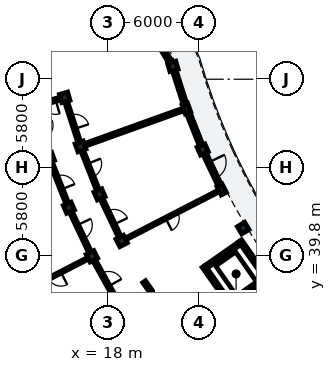
"""IFC4 building model, lengths in metres.
Left out: names, types, materials, properties, quantities, classifications, styles, units other than length and angle.
Written with IfcOpenShell. Run it as: python <this file> out.ifc"""

import sys

from ifc_helpers import new_model, si_unit, direction, frame, frame_2d, origin, origin_2d, place, context, subcontext, project, spatial, rectangle, extrude, element, fill, save


model = new_model("IFC4")
c1 = context("Model", 3, precision=1e-05, world=origin(), true_north=direction((0.0, 1.0)))
c2 = subcontext(c1, "Body", "Model", "MODEL_VIEW")
j1 = project(units=[si_unit("LENGTHUNIT", "METRE"), si_unit("PLANEANGLEUNIT", "RADIAN")], contexts=[c1])
p1 = place(None, origin())
s1 = spatial("IfcSite", under=j1, at=p1, CompositionType="ELEMENT")
p2 = place(p1, origin())
s2 = spatial("IfcBuilding", under=s1, at=p2, CompositionType="ELEMENT")
p3 = place(p2, frame((0.0, 0.0, 15.56)))
s3 = spatial("IfcBuildingStorey", under=s2, at=p3, CompositionType="ELEMENT", Elevation=15.56)
p4 = place(p3, frame((23.296, 34.01, 0.0), z_axis=(0.0, 0.0, 1.0), x_axis=(0.819153711596, 0.573574055182, 0.0)))
e1 = element("IfcWall", 1, at=p4, inside=s3, PredefinedType="SHEAR", context=c2, shape_type="SweptSolid", body=[
    extrude(rectangle(XDim=6.6, YDim=0.25, at=frame_2d((3.3, 0.0))), origin(), (0.0, 0.0, 1.0), 3.11),
])
p5 = place(p4, frame((0.22, 0.0, 0.0)))
e2 = element("IfcOpeningElement", 2, at=p5, cuts=e1, PredefinedType="OPENING", context=c2, shape_type="SweptSolid", body=[
    extrude(rectangle(XDim=1.05, YDim=2.15, at=frame_2d((0.525, 1.075))), frame((0.0, 0.135, 0.0), z_axis=(0.0, -1.0, 0.0), x_axis=(1.0, 0.0, 0.0)), (0.0, 0.0, 1.0), 0.27),
])
p6 = place(p3, frame((26.169, 36.419, 0.0), z_axis=(0.0, 0.0, 1.0), x_axis=(-0.573582966431, 0.819147471839, 0.0)))
e3 = element("IfcWall", 3, at=p6, inside=s3, PredefinedType="SHEAR", context=c2, shape_type="SweptSolid", body=[
    extrude(rectangle(XDim=3.26, YDim=0.23, at=frame_2d((1.63, 0.0))), origin(), (0.0, 0.0, 1.0), 3.11),
])
p7 = place(p6, frame((0.9, 0.0, 0.0)))
e4 = element("IfcOpeningElement", 4, at=p7, cuts=e3, PredefinedType="OPENING", context=c2, shape_type="SweptSolid", body=[
    extrude(rectangle(XDim=1.1, YDim=2.15, at=frame_2d((0.55, 1.075))), frame((0.0, 0.125, 0.0), z_axis=(0.0, -1.0, 0.0), x_axis=(1.0, 0.0, 0.0)), (0.0, 0.0, 1.0), 0.25),
])
p8 = place(p3, frame((28.569, 38.1, 0.0), z_axis=(0.0, 0.0, 1.0), x_axis=(-0.573582966431, 0.819147471839, 0.0)))
e5 = element("IfcWall", 5, at=p8, inside=s3, PredefinedType="SHEAR", context=c2, shape_type="SweptSolid", body=[
    extrude(rectangle(XDim=3.26, YDim=0.23, at=frame_2d((1.63, 0.0))), origin(), (0.0, 0.0, 1.0), 3.11),
])
p9 = place(p3, frame((26.197, 36.579, 0.0), z_axis=(0.0, 0.0, 1.0), x_axis=(0.819159695432, 0.573565509231, 0.0)))
e6 = element("IfcWall", 6, at=p9, inside=s3, PredefinedType="SHEAR", context=c2, shape_type="SweptSolid", body=[
    extrude(rectangle(XDim=2.7, YDim=0.23, at=frame_2d((1.35, 0.0))), origin(), (0.0, 0.0, 1.0), 3.11),
])
p10 = place(p3, frame((24.459, 39.061, 0.0), z_axis=(0.0, 0.0, 1.0), x_axis=(0.819189439894, 0.573523026186, 0.0)))
e7 = element("IfcWall", 7, at=p10, inside=s3, PredefinedType="SHEAR", context=c2, shape_type="SweptSolid", body=[
    extrude(rectangle(XDim=2.7, YDim=0.23, at=frame_2d((1.35, 0.0))), origin(), (0.0, 0.0, 1.0), 3.11),
])
for number, where, z_axis, x_axis in (
    (8, (22.272, 52.248, 0.0), (0.0, 0.0, 1.0), (-0.961, -0.276, 0.0)),
    (9, (15.159, 50.208, 0.0), (0.0, 0.0, 1.0), (-0.961, -0.276, 0.0)),
):
    element("IfcColumn", number, at=place(p3, frame(where, z_axis=z_axis, x_axis=x_axis)), inside=s3, PredefinedType="COLUMN", context=c2, shape_type="SweptSolid", body=[
        extrude(rectangle(XDim=0.56, YDim=0.56, at=origin_2d()), origin(), (0.0, 0.0, 1.0), 3.11),
    ])
p11 = place(p3, frame((23.165, 49.479, 0.0), z_axis=(0.0, 0.0, 1.0), x_axis=(-0.941176015256, -0.337916718003, 0.0)))
e10 = element("IfcColumn", 10, at=p11, inside=s3, PredefinedType="PILASTER", context=c2, shape_type="SweptSolid", body=[
    extrude(rectangle(XDim=0.38, YDim=0.62, at=origin_2d()), origin(), (0.0, 0.0, 1.0), 3.11),
])
for number, where, z_axis, x_axis in (
    (11, (16.2, 46.979, 0.0), (0.0, 0.0, 1.0), (-0.941, -0.338, 0.0)),
    (12, (14.129, 46.236, 0.0), (0.0, 0.0, 1.0), (-0.941, -0.338, 0.0)),
    (13, (24.237, 46.776, 0.0), (0.0, 0.0, 1.0), (-0.917, -0.399, 0.0)),
    (14, (17.45, 43.825, 0.0), (0.0, 0.0, 1.0), (-0.917, -0.399, 0.0)),
    (15, (15.433, 42.948, 0.0), (0.0, 0.0, 1.0), (-0.917, -0.399, 0.0)),
):
    element("IfcColumn", number, at=place(p3, frame(where, z_axis=z_axis, x_axis=x_axis)), inside=s3, PredefinedType="COLUMN", context=c2, shape_type="SweptSolid", body=[
        extrude(rectangle(XDim=0.56, YDim=0.56, at=origin_2d()), origin(), (0.0, 0.0, 1.0), 3.11),
    ])
p12 = place(p3, frame((25.483, 44.147, 0.0), z_axis=(0.0, 0.0, 1.0), x_axis=(-0.889017141486, -0.457873915117, 0.0)))
e16 = element("IfcColumn", 16, at=p12, inside=s3, PredefinedType="PILASTER", context=c2, shape_type="SweptSolid", body=[
    extrude(rectangle(XDim=0.38, YDim=0.62, at=origin_2d()), origin(), (0.0, 0.0, 1.0), 3.11),
])
for number, where, z_axis, x_axis in (
    (17, (18.905, 40.759, 0.0), (0.0, 0.0, 1.0), (-0.889, -0.458, 0.0)),
    (18, (16.949, 39.752, 0.0), (0.0, 0.0, 1.0), (-0.889, -0.458, 0.0)),
    (19, (26.899, 41.606, 0.0), (0.0, 0.0, 1.0), (-0.857, -0.515, 0.0)),
):
    element("IfcColumn", number, at=place(p3, frame(where, z_axis=z_axis, x_axis=x_axis)), inside=s3, PredefinedType="COLUMN", context=c2, shape_type="SweptSolid", body=[
        extrude(rectangle(XDim=0.56, YDim=0.56, at=origin_2d()), origin(), (0.0, 0.0, 1.0), 3.11),
    ])
p13 = place(p3, frame((22.349, 52.01, 0.0), z_axis=(0.0, 0.0, 1.0), x_axis=(0.306979942778, -0.951715984279, 0.0)))
e20 = element("IfcWall", 20, at=p13, inside=s3, PredefinedType="SOLIDWALL", context=c2, shape_type="SweptSolid", body=[
    extrude(rectangle(XDim=2.499, YDim=0.245, at=frame_2d((1.25, 0.0))), origin(), (0.0, 0.0, 1.0), 2.355),
])
p14 = place(p13, frame((0.649, 0.0, 0.55)))
e21 = element("IfcOpeningElement", 21, at=p14, cuts=e20, PredefinedType="OPENING", context=c2, shape_type="SweptSolid", body=[
    extrude(rectangle(XDim=1.2, YDim=1.51, at=frame_2d((0.6, 0.755))), frame((0.0, 0.133, 0.0), z_axis=(0.0, -1.0, 0.0), x_axis=(1.0, 0.0, 0.0)), (0.0, 0.0, 1.0), 0.265),
])
p15 = place(p3, frame((23.224, 49.331, 0.0), z_axis=(0.0, 0.0, 1.0), x_axis=(0.368558756085, -0.9296044553, 0.0)))
e22 = element("IfcWall", 22, at=p15, inside=s3, PredefinedType="SOLIDWALL", context=c2, shape_type="SweptSolid", body=[
    extrude(rectangle(XDim=2.499, YDim=0.245, at=frame_2d((1.249, 0.0))), origin(), (0.0, 0.0, 1.0), 2.355),
])
p16 = place(p15, frame((0.589, 0.0, 0.55)))
e23 = element("IfcOpeningElement", 23, at=p16, cuts=e22, PredefinedType="OPENING", context=c2, shape_type="SweptSolid", body=[
    extrude(rectangle(XDim=1.32, YDim=1.585, at=frame_2d((0.66, 0.792))), frame((0.0, 0.133, 0.0), z_axis=(0.0, -1.0, 0.0), x_axis=(1.0, 0.0, 0.0)), (0.0, 0.0, 1.0), 0.265),
])
p17 = place(p3, frame((24.344, 46.55, 0.0), z_axis=(0.0, 0.0, 1.0), x_axis=(0.428514676045, -0.903534820809, 0.0)))
e24 = element("IfcWall", 24, at=p17, inside=s3, PredefinedType="SOLIDWALL", context=c2, shape_type="SweptSolid", body=[
    extrude(rectangle(XDim=2.499, YDim=0.245, at=frame_2d((1.25, 0.0))), origin(), (0.0, 0.0, 1.0), 2.355),
])
p18 = place(p17, frame((0.679, 0.0, 0.0)))
e25 = element("IfcOpeningElement", 25, at=p18, cuts=e24, PredefinedType="OPENING", context=c2, shape_type="SweptSolid", body=[
    extrude(rectangle(XDim=1.14, YDim=2.16, at=frame_2d((0.57, 1.08))), frame((0.0, 0.133, 0.0), z_axis=(0.0, -1.0, 0.0), x_axis=(1.0, 0.0, 0.0)), (0.0, 0.0, 1.0), 0.265),
])
p19 = place(p3, frame((20.259, 55.598, 0.0), z_axis=(0.0, 0.0, 1.0), x_axis=(0.515037642827, -0.857167560324, 0.0)))
e26 = element("IfcWall", 26, at=p19, inside=s3, PredefinedType="SOLIDWALL", context=c2, shape_type="SweptSolid", body=[
    extrude(rectangle(XDim=3.908, YDim=0.245, at=frame_2d((1.954, 0.0))), origin(), (0.0, 0.0, 1.0), 2.355),
])
p20 = place(p19, frame((0.979, 0.0, 0.4)))
e27 = element("IfcOpeningElement", 27, at=p20, cuts=e26, PredefinedType="OPENING", context=c2, shape_type="SweptSolid", body=[
    extrude(rectangle(XDim=1.95, YDim=1.78, at=frame_2d((0.975, 0.89))), frame((0.0, 0.133, 0.0), z_axis=(0.0, -1.0, 0.0), x_axis=(1.0, 0.0, 0.0)), (0.0, 0.0, 1.0), 0.265),
])
p21 = place(p3, frame((23.195, 34.068, 0.0), z_axis=(0.0, 0.0, 1.0), x_axis=(-0.573572687386, 0.819154669329, 0.0)))
e28 = element("IfcWall", 28, at=p21, inside=s3, PredefinedType="PARTITIONING", context=c2, shape_type="SweptSolid", body=[
    extrude(rectangle(XDim=4.9, YDim=0.22, at=frame_2d((2.45, 0.0))), origin(), (0.0, 0.0, 1.0), 2.34),
])
p22 = place(p21, frame((1.95, 0.0, 0.0)))
e29 = element("IfcOpeningElement", 29, at=p22, cuts=e28, PredefinedType="OPENING", context=c2, shape_type="SweptSolid", body=[
    extrude(rectangle(XDim=1.0, YDim=2.15, at=frame_2d((0.5, 1.075))), frame((0.0, 0.12, 0.0), z_axis=(0.0, -1.0, 0.0), x_axis=(1.0, 0.0, 0.0)), (0.0, 0.0, 1.0), 0.24),
])
p23 = place(p3, frame((15.266, 49.875, 0.0), z_axis=(0.0, 0.0, 1.0), x_axis=(0.306883578189, -0.951747061691, 0.0)))
e30 = element("IfcWall", 30, at=p23, inside=s3, PredefinedType="PARTITIONING", context=c2, shape_type="SweptSolid", body=[
    extrude(rectangle(XDim=2.693, YDim=0.195, at=frame_2d((1.346, 0.0))), origin(), (0.0, 0.0, 1.0), 2.37),
])
p24 = place(p23, frame((0.872, 0.0, 0.0)))
e31 = element("IfcOpeningElement", 31, at=p24, cuts=e30, PredefinedType="OPENING", context=c2, shape_type="SweptSolid", body=[
    extrude(rectangle(XDim=0.95, YDim=2.13, at=frame_2d((0.475, 1.065))), frame((0.0, 0.107, 0.0), z_axis=(0.0, -1.0, 0.0), x_axis=(1.0, 0.0, 0.0)), (0.0, 0.0, 1.0), 0.215),
])
p25 = place(p3, frame((22.788, 49.344, 0.0), z_axis=(0.0, 0.0, 1.0), x_axis=(-0.941179890997, -0.337905922978, 0.0)))
e32 = element("IfcWall", 32, at=p25, inside=s3, PredefinedType="PARTITIONING", context=c2, shape_type="SweptSolid", body=[
    extrude(rectangle(XDim=6.6, YDim=0.185, at=frame_2d((3.3, 0.0))), origin(), (0.0, 0.0, 1.0), 2.37),
])
p26 = place(p3, frame((14.258, 45.91, 0.0), z_axis=(0.0, 0.0, 1.0), x_axis=(0.368584691693, -0.929594172233, 0.0)))
e33 = element("IfcWall", 33, at=p26, inside=s3, PredefinedType="PARTITIONING", context=c2, shape_type="SweptSolid", body=[
    extrude(rectangle(XDim=2.837, YDim=0.195, at=frame_2d((1.418, 0.0))), origin(), (0.0, 0.0, 1.0), 2.37),
])
p27 = place(p26, frame((0.954, 0.0, 0.0)))
e34 = element("IfcOpeningElement", 34, at=p27, cuts=e33, PredefinedType="OPENING", context=c2, shape_type="SweptSolid", body=[
    extrude(rectangle(XDim=0.93, YDim=2.12, at=frame_2d((0.465, 1.06))), frame((0.0, 0.107, 0.0), z_axis=(0.0, -1.0, 0.0), x_axis=(1.0, 0.0, 0.0)), (0.0, 0.0, 1.0), 0.215),
])
p28 = place(p3, frame((16.329, 46.654, 0.0), z_axis=(0.0, 0.0, 1.0), x_axis=(0.368528468945, -0.929616462622, 0.0)))
e35 = element("IfcWall", 35, at=p28, inside=s3, PredefinedType="PARTITIONING", context=c2, shape_type="SweptSolid", body=[
    extrude(rectangle(XDim=2.693, YDim=0.195, at=frame_2d((1.346, 0.0))), origin(), (0.0, 0.0, 1.0), 2.37),
])
p29 = place(p28, frame((0.882, 0.0, 0.0)))
e36 = element("IfcOpeningElement", 36, at=p29, cuts=e35, PredefinedType="OPENING", context=c2, shape_type="SweptSolid", body=[
    extrude(rectangle(XDim=0.93, YDim=2.12, at=frame_2d((0.465, 1.06))), frame((0.0, 0.107, 0.0), z_axis=(0.0, -1.0, 0.0), x_axis=(1.0, 0.0, 0.0)), (0.0, 0.0, 1.0), 0.215),
])
p30 = place(p3, frame((15.583, 42.631, 0.0), z_axis=(0.0, 0.0, 1.0), x_axis=(0.428493237107, -0.903544988229, 0.0)))
e37 = element("IfcWall", 37, at=p30, inside=s3, PredefinedType="PARTITIONING", context=c2, shape_type="SweptSolid", body=[
    extrude(rectangle(XDim=2.837, YDim=0.195, at=frame_2d((1.418, 0.0))), origin(), (0.0, 0.0, 1.0), 2.37),
])
p31 = place(p30, frame((0.924, 0.0, 0.0)))
e38 = element("IfcOpeningElement", 38, at=p31, cuts=e37, PredefinedType="OPENING", context=c2, shape_type="SweptSolid", body=[
    extrude(rectangle(XDim=0.99, YDim=2.16, at=frame_2d((0.495, 1.08))), frame((0.0, 0.107, 0.0), z_axis=(0.0, -1.0, 0.0), x_axis=(1.0, 0.0, 0.0)), (0.0, 0.0, 1.0), 0.215),
])
p32 = place(p3, frame((17.6, 43.509, 0.0), z_axis=(0.0, 0.0, 1.0), x_axis=(0.428550049392, -0.903518043631, 0.0)))
e39 = element("IfcWall", 39, at=p32, inside=s3, PredefinedType="PARTITIONING", context=c2, shape_type="SweptSolid", body=[
    extrude(rectangle(XDim=2.693, YDim=0.195, at=frame_2d((1.346, 0.0))), origin(), (0.0, 0.0, 1.0), 2.37),
])
p33 = place(p32, frame((0.852, 0.0, 0.0)))
e40 = element("IfcOpeningElement", 40, at=p33, cuts=e39, PredefinedType="OPENING", context=c2, shape_type="SweptSolid", body=[
    extrude(rectangle(XDim=0.99, YDim=2.16, at=frame_2d((0.495, 1.08))), frame((0.0, 0.107, 0.0), z_axis=(0.0, -1.0, 0.0), x_axis=(1.0, 0.0, 0.0)), (0.0, 0.0, 1.0), 0.215),
])
p34 = place(p3, frame((16.593, 39.569, 0.0), z_axis=(0.0, 0.0, 1.0), x_axis=(-0.889013002038, -0.457881952262, 0.0)))
e41 = element("IfcWall", 41, at=p34, inside=s3, PredefinedType="PARTITIONING", context=c2, shape_type="SweptSolid", body=[
    extrude(rectangle(XDim=4.7, YDim=0.125, at=frame_2d((2.35, 0.0))), origin(), (0.0, 0.0, 1.0), 2.37),
])
p35 = place(p34, frame((1.895, 0.0, 0.0)))
e42 = element("IfcOpeningElement", 42, at=p35, cuts=e41, PredefinedType="OPENING", context=c2, shape_type="SweptSolid", body=[
    extrude(rectangle(XDim=0.91, YDim=2.1, at=frame_2d((0.455, 1.05))), frame((0.0, 0.073, 0.0), z_axis=(0.0, -1.0, 0.0), x_axis=(1.0, 0.0, 0.0)), (0.0, 0.0, 1.0), 0.145),
])
p36 = place(p3, frame((25.128, 43.964, 0.0), z_axis=(0.0, 0.0, 1.0), x_axis=(-0.889022010753, -0.457864460727, 0.0)))
e43 = element("IfcWall", 43, at=p36, inside=s3, PredefinedType="PARTITIONING", context=c2, shape_type="SweptSolid", body=[
    extrude(rectangle(XDim=6.6, YDim=0.125, at=frame_2d((3.3, 0.0))), origin(), (0.0, 0.0, 1.0), 2.37),
])
p37 = place(p36, frame((2.855, 0.0, 0.0)))
e44 = element("IfcOpeningElement", 44, at=p37, cuts=e43, PredefinedType="OPENING", context=c2, shape_type="SweptSolid", body=[
    extrude(rectangle(XDim=0.89, YDim=2.1, at=frame_2d((0.445, 1.05))), frame((0.0, 0.073, 0.0), z_axis=(0.0, -1.0, 0.0), x_axis=(1.0, 0.0, 0.0)), (0.0, 0.0, 1.0), 0.145),
])
p38 = place(p3, frame((17.119, 39.446, 0.0), z_axis=(0.0, 0.0, 1.0), x_axis=(0.48673124079, -0.8735517725, 0.0)))
e45 = element("IfcWall", 45, at=p38, inside=s3, PredefinedType="PARTITIONING", context=c2, shape_type="SweptSolid", body=[
    extrude(rectangle(XDim=2.837, YDim=0.195, at=frame_2d((1.418, 0.0))), origin(), (0.0, 0.0, 1.0), 2.37),
])
p39 = place(p38, frame((0.934, 0.0, 0.0)))
e46 = element("IfcOpeningElement", 46, at=p39, cuts=e45, PredefinedType="OPENING", context=c2, shape_type="SweptSolid", body=[
    extrude(rectangle(XDim=0.97, YDim=2.15, at=frame_2d((0.485, 1.075))), frame((0.0, 0.107, 0.0), z_axis=(0.0, -1.0, 0.0), x_axis=(1.0, 0.0, 0.0)), (0.0, 0.0, 1.0), 0.215),
])
p40 = place(p3, frame((15.111, 50.194, 0.0), z_axis=(0.0, 0.0, 1.0), x_axis=(-0.961264701934, -0.275626872449, 0.0)))
e47 = element("IfcWall", 47, at=p40, inside=s3, PredefinedType="PARTITIONING", context=c2, shape_type="SweptSolid", body=[
    extrude(rectangle(XDim=2.1, YDim=0.195, at=frame_2d((1.05, 0.0))), origin(), (0.0, 0.0, 1.0), 2.37),
])
p41 = place(p40, frame((0.57, 0.0, 0.0)))
e48 = element("IfcOpeningElement", 48, at=p41, cuts=e47, PredefinedType="OPENING", context=c2, shape_type="SweptSolid", body=[
    extrude(rectangle(XDim=0.95, YDim=2.13, at=frame_2d((0.475, 1.065))), frame((0.0, 0.107, 0.0), z_axis=(0.0, -1.0, 0.0), x_axis=(1.0, 0.0, 0.0)), (0.0, 0.0, 1.0), 0.215),
])
p42 = place(p14, origin())
e49 = element("IfcWindow", 49, at=p42, inside=s3, PartitioningType="SINGLE_PANEL", PredefinedType="WINDOW", context=c2, shape_type="SweptSolid", body=[
    extrude(rectangle(XDim=1.2, YDim=1.51, at=frame_2d((0.6, 0.755))), frame((0.0, 0.03, 0.0), z_axis=(0.0, -1.0, 0.0), x_axis=(1.0, 0.0, 0.0)), (0.0, 0.0, 1.0), 0.06),
])
fill(e21, e49)
p43 = place(p16, origin())
e50 = element("IfcWindow", 50, at=p43, inside=s3, PartitioningType="SINGLE_PANEL", PredefinedType="WINDOW", context=c2, shape_type="SweptSolid", body=[
    extrude(rectangle(XDim=1.32, YDim=1.585, at=frame_2d((0.66, 0.792))), frame((0.0, 0.03, 0.0), z_axis=(0.0, -1.0, 0.0), x_axis=(1.0, 0.0, 0.0)), (0.0, 0.0, 1.0), 0.06),
])
fill(e23, e50)
p44 = place(p18, origin())
e51 = element("IfcDoor", 51, at=p44, inside=s3, OperationType="SINGLE_SWING_LEFT", PredefinedType="DOOR", context=c2, shape_type="SweptSolid", body=[
    extrude(rectangle(XDim=1.14, YDim=2.16, at=frame_2d((0.57, 1.08))), frame((0.0, 0.025, 0.0), z_axis=(0.0, -1.0, 0.0), x_axis=(1.0, 0.0, 0.0)), (0.0, 0.0, 1.0), 0.05),
])
fill(e25, e51)
p45 = place(p20, origin())
e52 = element("IfcWindow", 52, at=p45, inside=s3, PartitioningType="SINGLE_PANEL", PredefinedType="WINDOW", context=c2, shape_type="SweptSolid", body=[
    extrude(rectangle(XDim=1.95, YDim=1.78, at=frame_2d((0.975, 0.89))), frame((0.0, 0.03, 0.0), z_axis=(0.0, -1.0, 0.0), x_axis=(1.0, 0.0, 0.0)), (0.0, 0.0, 1.0), 0.06),
])
fill(e27, e52)
p46 = place(p7, origin())
e53 = element("IfcDoor", 53, at=p46, inside=s3, OperationType="DOUBLE_DOOR_SLIDING", PredefinedType="DOOR", context=c2, shape_type="SweptSolid", body=[
    extrude(rectangle(XDim=1.1, YDim=2.15, at=frame_2d((0.55, 1.075))), frame((0.0, 0.025, 0.0), z_axis=(0.0, -1.0, 0.0), x_axis=(1.0, 0.0, 0.0)), (0.0, 0.0, 1.0), 0.05),
])
fill(e4, e53)
p47 = place(p24, origin())
e54 = element("IfcDoor", 54, at=p47, inside=s3, OperationType="SINGLE_SWING_RIGHT", PredefinedType="DOOR", context=c2, shape_type="SweptSolid", body=[
    extrude(rectangle(XDim=0.95, YDim=2.13, at=frame_2d((0.475, 1.065))), frame((0.0, 0.025, 0.0), z_axis=(0.0, -1.0, 0.0), x_axis=(1.0, 0.0, 0.0)), (0.0, 0.0, 1.0), 0.05),
])
fill(e31, e54)
p48 = place(p27, origin())
e55 = element("IfcDoor", 55, at=p48, inside=s3, OperationType="SINGLE_SWING_RIGHT", PredefinedType="DOOR", context=c2, shape_type="SweptSolid", body=[
    extrude(rectangle(XDim=0.93, YDim=2.12, at=frame_2d((0.465, 1.06))), frame((0.0, 0.025, 0.0), z_axis=(0.0, -1.0, 0.0), x_axis=(1.0, 0.0, 0.0)), (0.0, 0.0, 1.0), 0.05),
])
fill(e34, e55)
p49 = place(p29, origin())
e56 = element("IfcDoor", 56, at=p49, inside=s3, OperationType="SINGLE_SWING_LEFT", PredefinedType="DOOR", context=c2, shape_type="SweptSolid", body=[
    extrude(rectangle(XDim=0.93, YDim=2.12, at=frame_2d((0.465, 1.06))), frame((0.0, 0.025, 0.0), z_axis=(0.0, -1.0, 0.0), x_axis=(1.0, 0.0, 0.0)), (0.0, 0.0, 1.0), 0.05),
])
fill(e36, e56)
p50 = place(p31, origin())
e57 = element("IfcDoor", 57, at=p50, inside=s3, OperationType="SINGLE_SWING_LEFT", PredefinedType="DOOR", context=c2, shape_type="SweptSolid", body=[
    extrude(rectangle(XDim=0.99, YDim=2.16, at=frame_2d((0.495, 1.08))), frame((0.0, 0.025, 0.0), z_axis=(0.0, -1.0, 0.0), x_axis=(1.0, 0.0, 0.0)), (0.0, 0.0, 1.0), 0.05),
])
fill(e38, e57)
p51 = place(p33, origin())
e58 = element("IfcDoor", 58, at=p51, inside=s3, OperationType="SINGLE_SWING_RIGHT", PredefinedType="DOOR", context=c2, shape_type="SweptSolid", body=[
    extrude(rectangle(XDim=0.99, YDim=2.16, at=frame_2d((0.495, 1.08))), frame((0.0, 0.025, 0.0), z_axis=(0.0, -1.0, 0.0), x_axis=(1.0, 0.0, 0.0)), (0.0, 0.0, 1.0), 0.05),
])
fill(e40, e58)
p52 = place(p35, origin())
e59 = element("IfcDoor", 59, at=p52, inside=s3, OperationType="SINGLE_SWING_LEFT", PredefinedType="DOOR", context=c2, shape_type="SweptSolid", body=[
    extrude(rectangle(XDim=0.91, YDim=2.1, at=frame_2d((0.455, 1.05))), frame((0.0, 0.025, 0.0), z_axis=(0.0, -1.0, 0.0), x_axis=(1.0, 0.0, 0.0)), (0.0, 0.0, 1.0), 0.05),
])
fill(e42, e59)
p53 = place(p37, origin())
e60 = element("IfcDoor", 60, at=p53, inside=s3, OperationType="SINGLE_SWING_RIGHT", PredefinedType="DOOR", context=c2, shape_type="SweptSolid", body=[
    extrude(rectangle(XDim=0.89, YDim=2.1, at=frame_2d((0.445, 1.05))), frame((0.0, 0.025, 0.0), z_axis=(0.0, -1.0, 0.0), x_axis=(1.0, 0.0, 0.0)), (0.0, 0.0, 1.0), 0.05),
])
fill(e44, e60)
p54 = place(p39, origin())
e61 = element("IfcDoor", 61, at=p54, inside=s3, OperationType="SINGLE_SWING_RIGHT", PredefinedType="DOOR", context=c2, shape_type="SweptSolid", body=[
    extrude(rectangle(XDim=0.97, YDim=2.15, at=frame_2d((0.485, 1.075))), frame((0.0, 0.025, 0.0), z_axis=(0.0, -1.0, 0.0), x_axis=(1.0, 0.0, 0.0)), (0.0, 0.0, 1.0), 0.05),
])
fill(e46, e61)
p55 = place(p41, origin())
e62 = element("IfcDoor", 62, at=p55, inside=s3, OperationType="SINGLE_SWING_LEFT", PredefinedType="DOOR", context=c2, shape_type="SweptSolid", body=[
    extrude(rectangle(XDim=0.95, YDim=2.13, at=frame_2d((0.475, 1.065))), frame((0.0, 0.025, 0.0), z_axis=(0.0, -1.0, 0.0), x_axis=(1.0, 0.0, 0.0)), (0.0, 0.0, 1.0), 0.05),
])
fill(e48, e62)
save(model, sys.argv[1])
